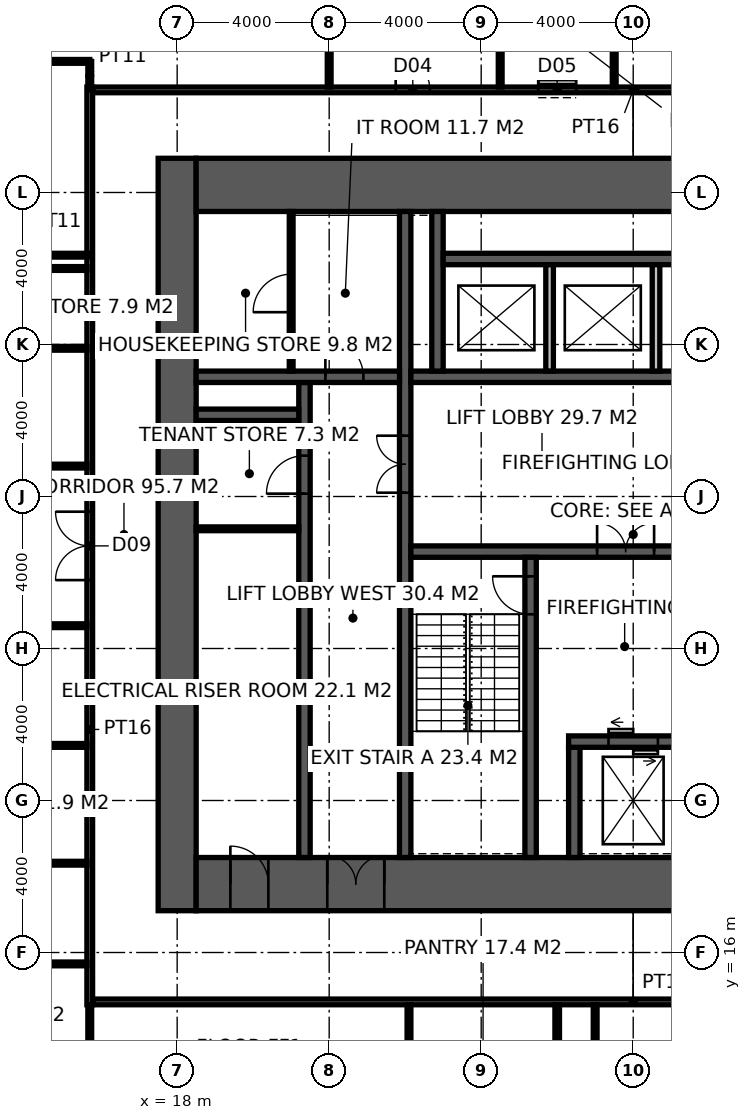
"""IFC4 building model, lengths in metres.
Left out: names, types, materials, properties, quantities, classifications, styles, units other than length and angle.
Written with IfcOpenShell. Run it as: python <this file> out.ifc"""

import sys

from ifc_helpers import new_model, si_unit, direction, frame, frame_2d, origin, place, context, subcontext, project, spatial, rectangle, extrude, element, fill, save


model = new_model("IFC4")
c1 = context("Model", 3, precision=1e-05, world=origin(), true_north=direction((0.0, 1.0)))
c2 = subcontext(c1, "Body", "Model", "MODEL_VIEW")
j1 = project(units=[si_unit("LENGTHUNIT", "METRE"), si_unit("PLANEANGLEUNIT", "RADIAN")], contexts=[c1])
p1 = place(None, origin())
s1 = spatial("IfcSite", under=j1, at=p1, CompositionType="ELEMENT")
p2 = place(p1, origin())
s2 = spatial("IfcBuilding", under=s1, at=p2, CompositionType="ELEMENT")
p3 = place(p2, frame((0.0, 0.0, 39.0)))
s3 = spatial("IfcBuildingStorey", under=s2, at=p3, CompositionType="ELEMENT", Elevation=39.0)
p4 = place(p3, frame((18.0, 17.1, -0.15), z_axis=(0.0, 0.0, 1.0), x_axis=(0.0, 1.0, 0.0)))
e1 = element("IfcWall", 1, at=p4, inside=s3, PredefinedType="SHEAR", context=c2, shape_type="SweptSolid", body=[
    extrude(rectangle(XDim=19.8, YDim=1.0, at=frame_2d((9.9, 0.0))), origin(), (0.0, 0.0, 1.0), 4.0),
])
p5 = place(p3, frame((18.5, 17.8, -0.15), z_axis=(0.0, 0.0, 1.0), x_axis=(1.0, 0.0, 0.0)))
e2 = element("IfcWall", 2, at=p5, inside=s3, PredefinedType="SHEAR", context=c2, shape_type="SweptSolid", body=[
    extrude(rectangle(XDim=23.0, YDim=1.4, at=frame_2d((11.5, 0.0))), origin(), (0.0, 0.0, 1.0), 4.0),
])
p6 = place(p5, frame((3.45, 0.0, 0.15)))
e3 = element("IfcOpeningElement", 3, at=p6, cuts=e2, PredefinedType="OPENING", context=c2, shape_type="SweptSolid", body=[
    extrude(rectangle(XDim=1.5, YDim=2.4, at=frame_2d((0.75, 1.2))), frame((0.0, 0.71, 0.0), z_axis=(0.0, -1.0, 0.0), x_axis=(1.0, 0.0, 0.0)), (0.0, 0.0, 1.0), 1.42),
])
p7 = place(p5, frame((17.9, 0.0, 0.15)))
e4 = element("IfcOpeningElement", 4, at=p7, cuts=e2, PredefinedType="OPENING", context=c2, shape_type="SweptSolid", body=[
    extrude(rectangle(XDim=1.5, YDim=2.4, at=frame_2d((0.75, 1.2))), frame((0.0, 0.71, 0.0), z_axis=(0.0, -1.0, 0.0), x_axis=(1.0, 0.0, 0.0)), (0.0, 0.0, 1.0), 1.42),
])
p8 = place(p5, frame((0.9, 0.0, 0.15)))
e5 = element("IfcOpeningElement", 5, at=p8, cuts=e2, PredefinedType="OPENING", context=c2, shape_type="SweptSolid", body=[
    extrude(rectangle(XDim=1.0, YDim=2.2, at=frame_2d((0.5, 1.1))), frame((0.0, 0.71, 0.0), z_axis=(0.0, -1.0, 0.0), x_axis=(1.0, 0.0, 0.0)), (0.0, 0.0, 1.0), 1.42),
])
p9 = place(p3, frame((18.5, 36.2, -0.15), z_axis=(0.0, 0.0, 1.0), x_axis=(1.0, 0.0, 0.0)))
e6 = element("IfcWall", 6, at=p9, inside=s3, PredefinedType="SHEAR", context=c2, shape_type="SweptSolid", body=[
    extrude(rectangle(XDim=23.0, YDim=1.4, at=frame_2d((11.5, 0.0))), origin(), (0.0, 0.0, 1.0), 4.0),
])
p10 = place(p3, frame((24.0, 18.5, -0.15), z_axis=(0.0, 0.0, 1.0), x_axis=(0.0, 1.0, 0.0)))
e7 = element("IfcWall", 7, at=p10, inside=s3, PredefinedType="SHEAR", context=c2, shape_type="SweptSolid", body=[
    extrude(rectangle(XDim=17.0, YDim=0.3, at=frame_2d((8.5, 0.0))), origin(), (0.0, 0.0, 1.0), 4.0),
])
p11 = place(p10, frame((9.6, 0.0, 0.15)))
e8 = element("IfcOpeningElement", 8, at=p11, cuts=e7, PredefinedType="OPENING", context=c2, shape_type="SweptSolid", body=[
    extrude(rectangle(XDim=1.5, YDim=2.4, at=frame_2d((0.75, 1.2))), frame((0.0, 0.16, 0.0), z_axis=(0.0, -1.0, 0.0), x_axis=(1.0, 0.0, 0.0)), (0.0, 0.0, 1.0), 0.32),
])
p12 = place(p3, frame((24.15, 26.55, -0.15), z_axis=(0.0, 0.0, 1.0), x_axis=(1.0, 0.0, 0.0)))
e9 = element("IfcWall", 9, at=p12, inside=s3, PredefinedType="SHEAR", context=c2, shape_type="SweptSolid", body=[
    extrude(rectangle(XDim=11.25, YDim=0.3, at=frame_2d((5.625, 0.0))), origin(), (0.0, 0.0, 1.0), 4.0),
])
p13 = place(p12, frame((9.25, 0.0, 0.15)))
e10 = element("IfcOpeningElement", 10, at=p13, cuts=e9, PredefinedType="OPENING", context=c2, shape_type="SweptSolid", body=[
    extrude(rectangle(XDim=1.0, YDim=2.2, at=frame_2d((0.5, 1.1))), frame((0.0, 0.16, 0.0), z_axis=(0.0, -1.0, 0.0), x_axis=(1.0, 0.0, 0.0)), (0.0, 0.0, 1.0), 0.32),
])
p14 = place(p12, frame((4.9, 0.0, 0.15)))
e11 = element("IfcOpeningElement", 11, at=p14, cuts=e9, PredefinedType="OPENING", context=c2, shape_type="SweptSolid", body=[
    extrude(rectangle(XDim=1.5, YDim=2.4, at=frame_2d((0.75, 1.2))), frame((0.0, 0.16, 0.0), z_axis=(0.0, -1.0, 0.0), x_axis=(1.0, 0.0, 0.0)), (0.0, 0.0, 1.0), 0.32),
])
p15 = place(p3, frame((27.3, 18.5, -0.15), z_axis=(0.0, 0.0, 1.0), x_axis=(0.0, 1.0, 0.0)))
e12 = element("IfcWall", 12, at=p15, inside=s3, PredefinedType="SHEAR", context=c2, shape_type="SweptSolid", body=[
    extrude(rectangle(XDim=7.9, YDim=0.3, at=frame_2d((3.95, 0.0))), origin(), (0.0, 0.0, 1.0), 4.0),
])
p16 = place(p15, frame((6.4, 0.0, 0.15)))
e13 = element("IfcOpeningElement", 13, at=p16, cuts=e12, PredefinedType="OPENING", context=c2, shape_type="SweptSolid", body=[
    extrude(rectangle(XDim=1.0, YDim=2.2, at=frame_2d((0.5, 1.1))), frame((0.0, 0.16, 0.0), z_axis=(0.0, -1.0, 0.0), x_axis=(1.0, 0.0, 0.0)), (0.0, 0.0, 1.0), 0.32),
])
p17 = place(p3, frame((28.45, 18.5, -0.15), z_axis=(0.0, 0.0, 1.0), x_axis=(0.0, 1.0, 0.0)))
e14 = element("IfcWall", 14, at=p17, inside=s3, PredefinedType="SHEAR", context=c2, shape_type="SweptSolid", body=[
    extrude(rectangle(XDim=2.9, YDim=0.3, at=frame_2d((1.45, 0.0))), origin(), (0.0, 0.0, 1.0), 4.0),
])
p18 = place(p3, frame((28.3, 21.55, -0.15), z_axis=(0.0, 0.0, 1.0), x_axis=(1.0, 0.0, 0.0)))
e15 = element("IfcWall", 15, at=p18, inside=s3, PredefinedType="SHEAR", context=c2, shape_type="SweptSolid", body=[
    extrude(rectangle(XDim=3.8, YDim=0.3, at=frame_2d((1.9, 0.0))), origin(), (0.0, 0.0, 1.0), 4.0),
])
p19 = place(p18, frame((1.05, 0.0, 0.15)))
e16 = element("IfcOpeningElement", 16, at=p19, cuts=e15, PredefinedType="OPENING", context=c2, shape_type="SweptSolid", body=[
    extrude(rectangle(XDim=1.3, YDim=2.4, at=frame_2d((0.65, 1.2))), frame((0.0, 0.16, 0.0), z_axis=(0.0, -1.0, 0.0), x_axis=(1.0, 0.0, 0.0)), (0.0, 0.0, 1.0), 0.32),
])
p20 = place(p3, frame((24.15, 31.15, -0.15), z_axis=(0.0, 0.0, 1.0), x_axis=(1.0, 0.0, 0.0)))
e17 = element("IfcWall", 17, at=p20, inside=s3, PredefinedType="SHEAR", context=c2, shape_type="SweptSolid", body=[
    extrude(rectangle(XDim=11.25, YDim=0.3, at=frame_2d((5.625, 0.0))), origin(), (0.0, 0.0, 1.0), 4.0),
])
p21 = place(p20, frame((7.25, 0.0, 0.15)))
e18 = element("IfcOpeningElement", 18, at=p21, cuts=e17, PredefinedType="OPENING", context=c2, shape_type="SweptSolid", body=[
    extrude(rectangle(XDim=1.4, YDim=2.4, at=frame_2d((0.7, 1.2))), frame((0.0, 0.16, 0.0), z_axis=(0.0, -1.0, 0.0), x_axis=(1.0, 0.0, 0.0)), (0.0, 0.0, 1.0), 0.32),
])
p22 = place(p3, frame((21.35, 18.5, -0.15), z_axis=(0.0, 0.0, 1.0), x_axis=(0.0, 1.0, 0.0)))
e19 = element("IfcWall", 19, at=p22, inside=s3, PredefinedType="SHEAR", context=c2, shape_type="SweptSolid", body=[
    extrude(rectangle(XDim=12.5, YDim=0.3, at=frame_2d((6.25, 0.0))), origin(), (0.0, 0.0, 1.0), 4.0),
])
p23 = place(p22, frame((9.575, 0.0, 0.15)))
e20 = element("IfcOpeningElement", 20, at=p23, cuts=e19, PredefinedType="OPENING", context=c2, shape_type="SweptSolid", body=[
    extrude(rectangle(XDim=1.0, YDim=2.2, at=frame_2d((0.5, 1.1))), frame((0.0, 0.16, 0.0), z_axis=(0.0, -1.0, 0.0), x_axis=(1.0, 0.0, 0.0)), (0.0, 0.0, 1.0), 0.32),
])
p24 = place(p3, frame((18.5, 31.15, -0.15), z_axis=(0.0, 0.0, 1.0), x_axis=(1.0, 0.0, 0.0)))
e21 = element("IfcWall", 21, at=p24, inside=s3, PredefinedType="SHEAR", context=c2, shape_type="SweptSolid", body=[
    extrude(rectangle(XDim=5.35, YDim=0.3, at=frame_2d((2.675, 0.0))), origin(), (0.0, 0.0, 1.0), 4.0),
])
p25 = place(p24, frame((3.4, 0.0, 0.15)))
e22 = element("IfcOpeningElement", 22, at=p25, cuts=e21, PredefinedType="OPENING", context=c2, shape_type="SweptSolid", body=[
    extrude(rectangle(XDim=1.0, YDim=2.2, at=frame_2d((0.5, 1.1))), frame((0.0, 0.16, 0.0), z_axis=(0.0, -1.0, 0.0), x_axis=(1.0, 0.0, 0.0)), (0.0, 0.0, 1.0), 0.32),
])
p26 = place(p3, frame((18.5, 30.15, -0.15), z_axis=(0.0, 0.0, 1.0), x_axis=(1.0, 0.0, 0.0)))
e23 = element("IfcWall", 23, at=p26, inside=s3, PredefinedType="SHEAR", context=c2, shape_type="SweptSolid", body=[
    extrude(rectangle(XDim=2.7, YDim=0.3, at=frame_2d((1.35, 0.0))), origin(), (0.0, 0.0, 1.0), 4.0),
])
p27 = place(p3, frame((24.85, 31.3, -0.15), z_axis=(0.0, 0.0, 1.0), x_axis=(0.0, 1.0, 0.0)))
e24 = element("IfcWall", 24, at=p27, inside=s3, PredefinedType="SHEAR", context=c2, shape_type="SweptSolid", body=[
    extrude(rectangle(XDim=4.2, YDim=0.3, at=frame_2d((2.1, 0.0))), origin(), (0.0, 0.0, 1.0), 4.0),
])
p28 = place(p3, frame((25.0, 34.25, -0.15), z_axis=(0.0, 0.0, 1.0), x_axis=(1.0, 0.0, 0.0)))
e25 = element("IfcWall", 25, at=p28, inside=s3, PredefinedType="SHEAR", context=c2, shape_type="SweptSolid", body=[
    extrude(rectangle(XDim=8.6, YDim=0.3, at=frame_2d((4.3, 0.0))), origin(), (0.0, 0.0, 1.0), 4.0),
])
for number, where, z_axis, x_axis in (
    (26, (27.8, 31.3, -0.15), (0.0, 0.0, 1.0), (0.0, 1.0, 0.0)),
    (27, (30.6, 31.3, -0.15), (0.0, 0.0, 1.0), (0.0, 1.0, 0.0)),
):
    element("IfcWall", number, at=place(p3, frame(where, z_axis=z_axis, x_axis=x_axis)), inside=s3, PredefinedType="SOLIDWALL", context=c2, shape_type="SweptSolid", body=[
        extrude(rectangle(XDim=2.8, YDim=0.2, at=frame_2d((1.4, 0.0))), origin(), (0.0, 0.0, 1.0), 4.0),
    ])
p29 = place(p3, frame((21.0, 31.3, 0.0), z_axis=(0.0, 0.0, 1.0), x_axis=(0.0, 1.0, 0.0)))
e28 = element("IfcWall", 28, at=p29, inside=s3, PredefinedType="PARTITIONING", context=c2, shape_type="SweptSolid", body=[
    extrude(rectangle(XDim=4.2, YDim=0.1, at=frame_2d((2.1, 0.0))), origin(), (0.0, 0.0, 1.0), 3.85),
])
p30 = place(p29, frame((1.55, 0.0, 0.0)))
e29 = element("IfcOpeningElement", 29, at=p30, cuts=e28, PredefinedType="OPENING", context=c2, shape_type="SweptSolid", body=[
    extrude(rectangle(XDim=1.0, YDim=2.2, at=frame_2d((0.5, 1.1))), frame((0.0, 0.06, 0.0), z_axis=(0.0, -1.0, 0.0), x_axis=(1.0, 0.0, 0.0)), (0.0, 0.0, 1.0), 0.12),
])
p31 = place(p3, frame((18.5, 27.15, 0.0), z_axis=(0.0, 0.0, 1.0), x_axis=(1.0, 0.0, 0.0)))
e30 = element("IfcWall", 30, at=p31, inside=s3, PredefinedType="PARTITIONING", context=c2, shape_type="SweptSolid", body=[
    extrude(rectangle(XDim=2.7, YDim=0.1, at=frame_2d((1.35, 0.0))), origin(), (0.0, 0.0, 1.0), 3.85),
])
p32 = place(p3, frame((15.7, 14.625, 0.0), z_axis=(0.0, 0.0, 1.0), x_axis=(0.0, 1.0, 0.0)))
e31 = element("IfcWall", 31, at=p32, inside=s3, PredefinedType="PARTITIONING", context=c2, shape_type="SweptSolid", body=[
    extrude(rectangle(XDim=24.15, YDim=0.15, at=frame_2d((12.075, 0.0))), origin(), (0.0, 0.0, 1.0), 3.85),
])
p33 = place(p32, frame((11.175, 0.0, 0.0)))
e32 = element("IfcOpeningElement", 32, at=p33, cuts=e31, PredefinedType="OPENING", context=c2, shape_type="SweptSolid", body=[
    extrude(rectangle(XDim=1.8, YDim=2.4, at=frame_2d((0.9, 1.2))), frame((0.0, 0.085, 0.0), z_axis=(0.0, -1.0, 0.0), x_axis=(1.0, 0.0, 0.0)), (0.0, 0.0, 1.0), 0.17),
])
p34 = place(p3, frame((15.775, 14.7, 0.0), z_axis=(0.0, 0.0, 1.0), x_axis=(1.0, 0.0, 0.0)))
e33 = element("IfcWall", 33, at=p34, inside=s3, PredefinedType="PARTITIONING", context=c2, shape_type="SweptSolid", body=[
    extrude(rectangle(XDim=28.45, YDim=0.15, at=frame_2d((14.225, 0.0))), origin(), (0.0, 0.0, 1.0), 3.85),
])
p35 = place(p3, frame((15.775, 38.7, 0.0), z_axis=(0.0, 0.0, 1.0), x_axis=(1.0, 0.0, 0.0)))
e34 = element("IfcWall", 34, at=p35, inside=s3, PredefinedType="PARTITIONING", context=c2, shape_type="SweptSolid", body=[
    extrude(rectangle(XDim=28.45, YDim=0.15, at=frame_2d((14.225, 0.0))), origin(), (0.0, 0.0, 1.0), 3.85),
])
p36 = place(p35, frame((7.975, 0.0, 0.0)))
e35 = element("IfcOpeningElement", 35, at=p36, cuts=e34, PredefinedType="OPENING", context=c2, shape_type="SweptSolid", body=[
    extrude(rectangle(XDim=0.9, YDim=2.1, at=frame_2d((0.45, 1.05))), frame((0.0, 0.085, 0.0), z_axis=(0.0, -1.0, 0.0), x_axis=(1.0, 0.0, 0.0)), (0.0, 0.0, 1.0), 0.17),
])
p37 = place(p35, frame((11.725, 0.0, 0.0)))
e36 = element("IfcOpeningElement", 36, at=p37, cuts=e34, PredefinedType="OPENING", context=c2, shape_type="SweptSolid", body=[
    extrude(rectangle(XDim=1.0, YDim=2.1, at=frame_2d((0.5, 1.05))), frame((0.0, 0.085, 0.0), z_axis=(0.0, -1.0, 0.0), x_axis=(1.0, 0.0, 0.0)), (0.0, 0.0, 1.0), 0.17),
])
p38 = place(p35, frame((15.575, 0.0, 0.0)))
e37 = element("IfcOpeningElement", 37, at=p38, cuts=e34, PredefinedType="OPENING", context=c2, shape_type="SweptSolid", body=[
    extrude(rectangle(XDim=0.9, YDim=2.1, at=frame_2d((0.45, 1.05))), frame((0.0, 0.085, 0.0), z_axis=(0.0, -1.0, 0.0), x_axis=(1.0, 0.0, 0.0)), (0.0, 0.0, 1.0), 0.17),
])
p39 = place(p3, frame((22.0, 38.775, 0.0), z_axis=(0.0, 0.0, 1.0), x_axis=(0.0, 1.0, 0.0)))
e38 = element("IfcWall", 38, at=p39, inside=s3, PredefinedType="PARTITIONING", context=c2, shape_type="SweptSolid", body=[
    extrude(rectangle(XDim=3.275, YDim=0.1, at=frame_2d((1.638, 0.0))), origin(), (0.0, 0.0, 1.0), 2.65),
])
for number, where, z_axis, x_axis in (
    (39, (26.5, 38.775, 0.0), (0.0, 0.0, 1.0), (0.0, 1.0, 0.0)),
    (40, (29.5, 38.775, 0.0), (0.0, 0.0, 1.0), (0.0, 1.0, 0.0)),
):
    element("IfcWall", number, at=place(p3, frame(where, z_axis=z_axis, x_axis=x_axis)), inside=s3, PredefinedType="PARTITIONING", context=c2, shape_type="SweptSolid", body=[
        extrude(rectangle(XDim=3.175, YDim=0.1, at=frame_2d((1.587, 0.0))), origin(), (0.0, 0.0, 1.0), 2.65),
    ])
p40 = place(p3, frame((28.0, -3.7, 0.0), z_axis=(0.0, 0.0, 1.0), x_axis=(0.0, 1.0, 0.0)))
e41 = element("IfcWall", 41, at=p40, inside=s3, PredefinedType="PARTITIONING", context=c2, shape_type="SweptSolid", body=[
    extrude(rectangle(XDim=18.325, YDim=0.12, at=frame_2d((9.163, 0.0))), origin(), (0.0, 0.0, 1.0), 3.85),
])
p41 = place(p3, frame((11.45, 15.7, 0.0), z_axis=(0.0, 0.0, 1.0), x_axis=(1.0, 0.0, 0.0)))
e42 = element("IfcWall", 42, at=p41, inside=s3, PredefinedType="PARTITIONING", context=c2, shape_type="SweptSolid", body=[
    extrude(rectangle(XDim=4.175, YDim=0.1, at=frame_2d((2.087, 0.0))), origin(), (0.0, 0.0, 1.0), 3.85),
])
for number, where, z_axis, x_axis in (
    (43, (11.55, 18.35, 0.0), (0.0, 0.0, 1.0), (1.0, 0.0, 0.0)),
    (44, (11.55, 21.45, 0.0), (0.0, 0.0, 1.0), (1.0, 0.0, 0.0)),
):
    element("IfcWall", number, at=place(p3, frame(where, z_axis=z_axis, x_axis=x_axis)), inside=s3, PredefinedType="PARTITIONING", context=c2, shape_type="SweptSolid", body=[
        extrude(rectangle(XDim=4.075, YDim=0.1, at=frame_2d((2.038, 0.0))), origin(), (0.0, 0.0, 1.0), 3.85),
    ])
p42 = place(p3, frame((11.45, 24.6, 0.0), z_axis=(0.0, 0.0, 1.0), x_axis=(1.0, 0.0, 0.0)))
e45 = element("IfcWall", 45, at=p42, inside=s3, PredefinedType="PARTITIONING", context=c2, shape_type="SweptSolid", body=[
    extrude(rectangle(XDim=4.175, YDim=0.1, at=frame_2d((2.087, 0.0))), origin(), (0.0, 0.0, 1.0), 2.65),
])
p43 = place(p3, frame((11.45, 28.8, 0.0), z_axis=(0.0, 0.0, 1.0), x_axis=(1.0, 0.0, 0.0)))
e46 = element("IfcWall", 46, at=p43, inside=s3, PredefinedType="PARTITIONING", context=c2, shape_type="SweptSolid", body=[
    extrude(rectangle(XDim=4.175, YDim=0.1, at=frame_2d((2.087, 0.0))), origin(), (0.0, 0.0, 1.0), 3.85),
])
p44 = place(p3, frame((11.55, 31.9, 0.0), z_axis=(0.0, 0.0, 1.0), x_axis=(1.0, 0.0, 0.0)))
e47 = element("IfcWall", 47, at=p44, inside=s3, PredefinedType="PARTITIONING", context=c2, shape_type="SweptSolid", body=[
    extrude(rectangle(XDim=4.075, YDim=0.1, at=frame_2d((2.038, 0.0))), origin(), (0.0, 0.0, 1.0), 2.85),
])
p45 = place(p3, frame((11.45, 34.0, 0.0), z_axis=(0.0, 0.0, 1.0), x_axis=(1.0, 0.0, 0.0)))
e48 = element("IfcWall", 48, at=p45, inside=s3, PredefinedType="PARTITIONING", context=c2, shape_type="SweptSolid", body=[
    extrude(rectangle(XDim=4.175, YDim=0.1, at=frame_2d((2.087, 0.0))), origin(), (0.0, 0.0, 1.0), 3.85),
])
for number, where, z_axis, x_axis in (
    (49, (15.7, 9.95, 0.0), (0.0, 0.0, 1.0), (0.0, 1.0, 0.0)),
    (50, (24.1, 9.95, 0.0), (0.0, 0.0, 1.0), (0.0, 1.0, 0.0)),
    (51, (28.999, 9.95, 0.0), (0.0, 0.0, 1.0), (0.0, 1.0, 0.0)),
):
    element("IfcWall", number, at=place(p3, frame(where, z_axis=z_axis, x_axis=x_axis)), inside=s3, PredefinedType="PARTITIONING", context=c2, shape_type="SweptSolid", body=[
        extrude(rectangle(XDim=4.675, YDim=0.1, at=frame_2d((2.337, 0.0))), origin(), (0.0, 0.0, 1.0), 3.85),
    ])
p46 = place(p3, frame((15.7, 38.7, 0.0), z_axis=(0.0, 0.0, 1.0), x_axis=(0.0, 1.0, 0.0)))
e52 = element("IfcWall", 52, at=p46, inside=s3, PredefinedType="PARTITIONING", context=c2, shape_type="SweptSolid", body=[
    extrude(rectangle(XDim=0.75, YDim=0.1, at=frame_2d((0.375, 0.0))), origin(), (0.0, 0.0, 1.0), 3.85),
])
for number, where, z_axis, x_axis in (
    (53, (15.7, 39.45, 0.0), (0.0, 0.0, 1.0), (-1.0, 0.0, 0.0)),
    (54, (11.2, 34.35, 0.0), (0.0, 0.0, 1.0), (1.0, 0.0, 0.0)),
):
    element("IfcWall", number, at=place(p3, frame(where, z_axis=z_axis, x_axis=x_axis)), inside=s3, PredefinedType="PARTITIONING", context=c2, shape_type="SweptSolid", body=[
        extrude(rectangle(XDim=4.5, YDim=0.1, at=frame_2d((2.25, 0.0))), origin(), (0.0, 0.0, 1.0), 3.85),
    ])
p47 = place(p16, origin())
e55 = element("IfcDoor", 55, at=p47, inside=s3, OperationType="SINGLE_SWING_RIGHT", PredefinedType="DOOR", context=c2, shape_type="SweptSolid", body=[
    extrude(rectangle(XDim=1.0, YDim=2.2, at=frame_2d((0.5, 1.1))), frame((0.0, 0.025, 0.0), z_axis=(0.0, -1.0, 0.0), x_axis=(1.0, 0.0, 0.0)), (0.0, 0.0, 1.0), 0.05),
])
fill(e13, e55)
p48 = place(p14, origin())
e56 = element("IfcDoor", 56, at=p48, inside=s3, OperationType="DOUBLE_DOOR_DOUBLE_SWING", PredefinedType="DOOR", context=c2, shape_type="SweptSolid", body=[
    extrude(rectangle(XDim=1.5, YDim=2.4, at=frame_2d((0.75, 1.2))), frame((0.0, 0.025, 0.0), z_axis=(0.0, -1.0, 0.0), x_axis=(1.0, 0.0, 0.0)), (0.0, 0.0, 1.0), 0.05),
])
fill(e11, e56)
p49 = place(p11, origin())
e57 = element("IfcDoor", 57, at=p49, inside=s3, OperationType="DOUBLE_DOOR_DOUBLE_SWING", PredefinedType="DOOR", context=c2, shape_type="SweptSolid", body=[
    extrude(rectangle(XDim=1.5, YDim=2.4, at=frame_2d((0.75, 1.2))), frame((0.0, 0.025, 0.0), z_axis=(0.0, -1.0, 0.0), x_axis=(1.0, 0.0, 0.0)), (0.0, 0.0, 1.0), 0.05),
])
fill(e8, e57)
p50 = place(p25, origin())
e58 = element("IfcDoor", 58, at=p50, inside=s3, OperationType="SINGLE_SWING_LEFT", PredefinedType="DOOR", context=c2, shape_type="SweptSolid", body=[
    extrude(rectangle(XDim=1.0, YDim=2.2, at=frame_2d((0.5, 1.1))), frame((0.0, 0.025, 0.0), z_axis=(0.0, -1.0, 0.0), x_axis=(1.0, 0.0, 0.0)), (0.0, 0.0, 1.0), 0.05),
])
fill(e22, e58)
p51 = place(p30, origin())
e59 = element("IfcDoor", 59, at=p51, inside=s3, OperationType="SINGLE_SWING_LEFT", PredefinedType="DOOR", context=c2, shape_type="SweptSolid", body=[
    extrude(rectangle(XDim=1.0, YDim=2.2, at=frame_2d((0.5, 1.1))), frame((0.0, 0.025, 0.0), z_axis=(0.0, -1.0, 0.0), x_axis=(1.0, 0.0, 0.0)), (0.0, 0.0, 1.0), 0.05),
])
fill(e29, e59)
p52 = place(p23, origin())
e60 = element("IfcDoor", 60, at=p52, inside=s3, OperationType="SINGLE_SWING_LEFT", PredefinedType="DOOR", context=c2, shape_type="SweptSolid", body=[
    extrude(rectangle(XDim=1.0, YDim=2.2, at=frame_2d((0.5, 1.1))), frame((0.0, 0.025, 0.0), z_axis=(0.0, -1.0, 0.0), x_axis=(1.0, 0.0, 0.0)), (0.0, 0.0, 1.0), 0.05),
])
fill(e20, e60)
p53 = place(p6, origin())
e61 = element("IfcDoor", 61, at=p53, inside=s3, OperationType="DOUBLE_DOOR_DOUBLE_SWING", PredefinedType="DOOR", context=c2, shape_type="SweptSolid", body=[
    extrude(rectangle(XDim=1.5, YDim=2.4, at=frame_2d((0.75, 1.2))), frame((0.0, 0.025, 0.0), z_axis=(0.0, -1.0, 0.0), x_axis=(1.0, 0.0, 0.0)), (0.0, 0.0, 1.0), 0.05),
])
fill(e3, e61)
p54 = place(p8, origin())
e62 = element("IfcDoor", 62, at=p54, inside=s3, OperationType="SINGLE_SWING_LEFT", PredefinedType="DOOR", context=c2, shape_type="SweptSolid", body=[
    extrude(rectangle(XDim=1.0, YDim=2.2, at=frame_2d((0.5, 1.1))), frame((0.0, 0.025, 0.0), z_axis=(0.0, -1.0, 0.0), x_axis=(1.0, 0.0, 0.0)), (0.0, 0.0, 1.0), 0.05),
])
fill(e5, e62)
p55 = place(p36, origin())
e63 = element("IfcDoor", 63, at=p55, inside=s3, OperationType="SINGLE_SWING_LEFT", PredefinedType="DOOR", context=c2, shape_type="SweptSolid", body=[
    extrude(rectangle(XDim=0.9, YDim=2.1, at=frame_2d((0.45, 1.05))), frame((0.0, 0.025, 0.0), z_axis=(0.0, -1.0, 0.0), x_axis=(1.0, 0.0, 0.0)), (0.0, 0.0, 1.0), 0.05),
])
fill(e35, e63)
p56 = place(p37, origin())
e64 = element("IfcDoor", 64, at=p56, inside=s3, OperationType="SLIDING_TO_LEFT", PredefinedType="DOOR", context=c2, shape_type="SweptSolid", body=[
    extrude(rectangle(XDim=1.0, YDim=2.1, at=frame_2d((0.5, 1.05))), frame((0.0, 0.025, 0.0), z_axis=(0.0, -1.0, 0.0), x_axis=(1.0, 0.0, 0.0)), (0.0, 0.0, 1.0), 0.05),
])
fill(e36, e64)
p57 = place(p33, origin())
e65 = element("IfcDoor", 65, at=p57, inside=s3, OperationType="DOUBLE_DOOR_DOUBLE_SWING", PredefinedType="DOOR", context=c2, shape_type="SweptSolid", body=[
    extrude(rectangle(XDim=1.8, YDim=2.4, at=frame_2d((0.9, 1.2))), frame((0.0, 0.025, 0.0), z_axis=(0.0, -1.0, 0.0), x_axis=(1.0, 0.0, 0.0)), (0.0, 0.0, 1.0), 0.05),
])
fill(e32, e65)
p58 = place(p19, origin())
e66 = element("IfcDoor", 66, at=p58, inside=s3, OperationType="DOUBLE_DOOR_SLIDING", PredefinedType="DOOR", context=c2, shape_type="SweptSolid", body=[
    extrude(rectangle(XDim=1.3, YDim=2.4, at=frame_2d((0.65, 1.2))), frame((0.0, 0.025, 0.0), z_axis=(0.0, -1.0, 0.0), x_axis=(1.0, 0.0, 0.0)), (0.0, 0.0, 1.0), 0.05),
])
fill(e16, e66)
save(model, sys.argv[1])
